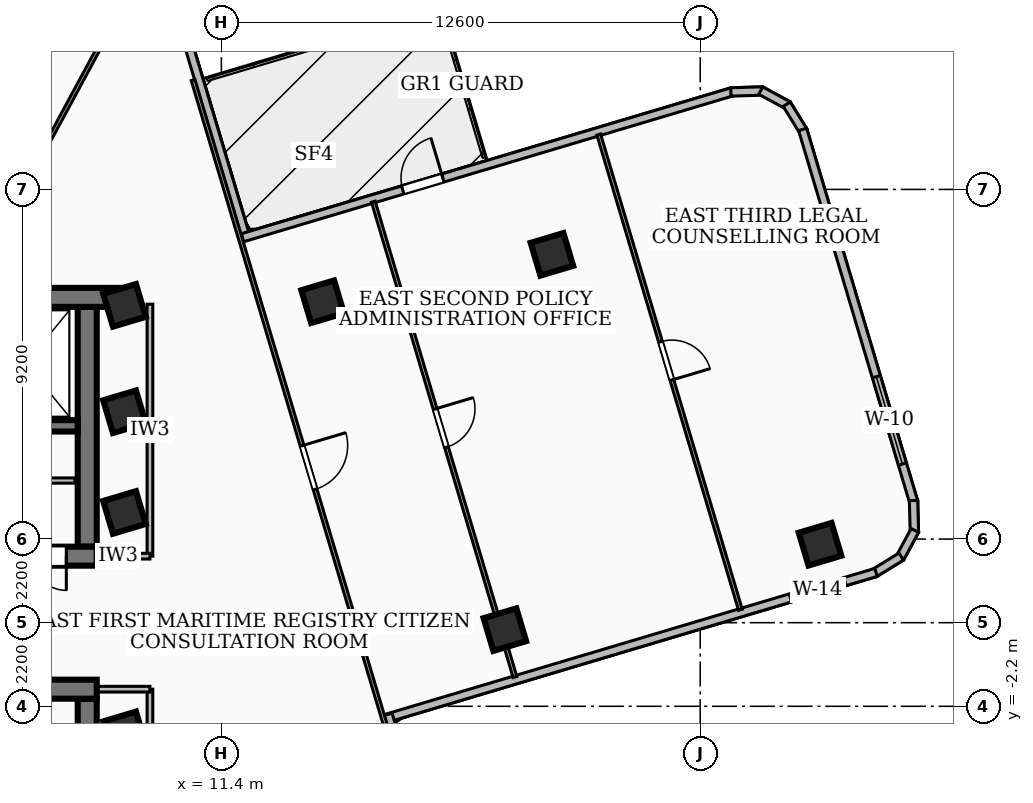
"""IFC4 building model, lengths in metres.
Left out: names, types, materials, properties, quantities, classifications, styles, units other than length and angle.
Written with IfcOpenShell. Run it as: python <this file> out.ifc"""

import sys

from ifc_helpers import new_model, si_unit, direction, frame, frame_2d, origin, origin_2d, place, context, subcontext, project, spatial, rectangle, extrude, element, fill, save


model = new_model("IFC4")
c1 = context("Model", 3, precision=1e-05, world=origin(), true_north=direction((0.0, 1.0)))
c2 = subcontext(c1, "Body", "Model", "MODEL_VIEW")
j1 = project(units=[si_unit("LENGTHUNIT", "METRE"), si_unit("PLANEANGLEUNIT", "RADIAN")], contexts=[c1])
p1 = place(None, origin())
s1 = spatial("IfcSite", under=j1, at=p1, CompositionType="ELEMENT")
p2 = place(p1, origin())
s2 = spatial("IfcBuilding", under=s1, at=p2, CompositionType="ELEMENT")
p3 = place(p2, frame((0.0, 0.0, 145.08)))
s3 = spatial("IfcBuildingStorey", under=s2, at=p3, CompositionType="ELEMENT", Elevation=145.08)
p4 = place(p3, frame((-8.78, 8.56, 0.0), z_axis=(0.0, 0.0, 1.0), x_axis=(1.0, 0.0, 0.0)))
e1 = element("IfcWall", 1, at=p4, inside=s3, PredefinedType="SHEAR", context=c2, shape_type="SweptSolid", body=[
    extrude(rectangle(XDim=17.56, YDim=0.5, at=frame_2d((8.78, 0.0))), origin(), (0.0, 0.0, 1.0), 3.32),
])
p5 = place(p3, frame((8.12, 1.75, 0.0), z_axis=(0.0, 0.0, 1.0), x_axis=(-1.0, 0.0, 0.0)))
e2 = element("IfcWall", 2, at=p5, inside=s3, PredefinedType="SHEAR", context=c2, shape_type="SweptSolid", body=[
    extrude(rectangle(XDim=16.24, YDim=0.5, at=frame_2d((8.12, 0.0))), origin(), (0.0, 0.0, 1.0), 3.32),
])
p6 = place(p5, frame((7.45, 0.0, 0.0)))
e3 = element("IfcOpeningElement", 3, at=p6, cuts=e2, PredefinedType="OPENING", context=c2, shape_type="SweptSolid", body=[
    extrude(rectangle(XDim=1.0, YDim=2.1, at=frame_2d((0.5, 1.05))), frame((0.0, 0.26, 0.0), z_axis=(0.0, -1.0, 0.0), x_axis=(1.0, 0.0, 0.0)), (0.0, 0.0, 1.0), 0.52),
])
p7 = place(p5, frame((3.85, 0.0, 0.0)))
e4 = element("IfcOpeningElement", 4, at=p7, cuts=e2, PredefinedType="OPENING", context=c2, shape_type="SweptSolid", body=[
    extrude(rectangle(XDim=0.9, YDim=2.06, at=frame_2d((0.45, 1.03))), frame((0.0, 0.26, 0.0), z_axis=(0.0, -1.0, 0.0), x_axis=(1.0, 0.0, 0.0)), (0.0, 0.0, 1.0), 0.52),
])
p8 = place(p5, frame((2.35, 0.0, 0.0)))
e5 = element("IfcOpeningElement", 5, at=p8, cuts=e2, PredefinedType="OPENING", context=c2, shape_type="SweptSolid", body=[
    extrude(rectangle(XDim=0.9, YDim=2.06, at=frame_2d((0.45, 1.03))), frame((0.0, 0.26, 0.0), z_axis=(0.0, -1.0, 0.0), x_axis=(1.0, 0.0, 0.0)), (0.0, 0.0, 1.0), 0.52),
])
p9 = place(p5, frame((0.8, 0.0, 0.0)))
e6 = element("IfcOpeningElement", 6, at=p9, cuts=e2, PredefinedType="OPENING", context=c2, shape_type="SweptSolid", body=[
    extrude(rectangle(XDim=0.9, YDim=2.06, at=frame_2d((0.45, 1.03))), frame((0.0, 0.26, 0.0), z_axis=(0.0, -1.0, 0.0), x_axis=(1.0, 0.0, 0.0)), (0.0, 0.0, 1.0), 0.52),
])
p10 = place(p3, frame((7.87, 8.31, 0.0), z_axis=(0.0, 0.0, 1.0), x_axis=(0.0, -1.0, 0.0)))
e7 = element("IfcWall", 7, at=p10, inside=s3, PredefinedType="SHEAR", context=c2, shape_type="SweptSolid", body=[
    extrude(rectangle(XDim=6.31, YDim=0.5, at=frame_2d((3.155, 0.0))), origin(), (0.0, 0.0, 1.0), 3.32),
])
p11 = place(p3, frame((7.62, 5.18, 0.0), z_axis=(0.0, 0.0, 1.0), x_axis=(-1.0, 0.0, 0.0)))
e8 = element("IfcWall", 8, at=p11, inside=s3, PredefinedType="SOLIDWALL", context=c2, shape_type="SweptSolid", body=[
    extrude(rectangle(XDim=15.24, YDim=0.3, at=frame_2d((7.62, 0.0))), origin(), (0.0, 0.0, 1.0), 3.32),
])
p12 = place(p11, frame((5.77, 0.0, 0.0)))
e9 = element("IfcOpeningElement", 9, at=p12, cuts=e8, PredefinedType="OPENING", context=c2, shape_type="SweptSolid", body=[
    extrude(rectangle(XDim=1.1, YDim=2.15, at=frame_2d((0.55, 1.075))), frame((0.0, 0.16, 0.0), z_axis=(0.0, -1.0, 0.0), x_axis=(1.0, 0.0, 0.0)), (0.0, 0.0, 1.0), 0.32),
])
p13 = place(p11, frame((2.97, 0.0, 0.0)))
e10 = element("IfcOpeningElement", 10, at=p13, cuts=e8, PredefinedType="OPENING", context=c2, shape_type="SweptSolid", body=[
    extrude(rectangle(XDim=1.1, YDim=2.15, at=frame_2d((0.55, 1.075))), frame((0.0, 0.16, 0.0), z_axis=(0.0, -1.0, 0.0), x_axis=(1.0, 0.0, 0.0)), (0.0, 0.0, 1.0), 0.32),
])
p14 = place(p11, frame((7.97, 0.0, 0.0)))
e11 = element("IfcOpeningElement", 11, at=p14, cuts=e8, PredefinedType="OPENING", context=c2, shape_type="SweptSolid", body=[
    extrude(rectangle(XDim=1.0, YDim=2.1, at=frame_2d((0.5, 1.05))), frame((0.0, 0.16, 0.0), z_axis=(0.0, -1.0, 0.0), x_axis=(1.0, 0.0, 0.0)), (0.0, 0.0, 1.0), 0.32),
])
p15 = place(p3, frame((-8.12, -1.75, 0.0), z_axis=(0.0, 0.0, 1.0), x_axis=(1.0, 0.0, 0.0)))
e12 = element("IfcWall", 12, at=p15, inside=s3, PredefinedType="SHEAR", context=c2, shape_type="SweptSolid", body=[
    extrude(rectangle(XDim=16.24, YDim=0.5, at=frame_2d((8.12, 0.0))), origin(), (0.0, 0.0, 1.0), 3.32),
])
p16 = place(p15, frame((7.45, 0.0, 0.0)))
e13 = element("IfcOpeningElement", 13, at=p16, cuts=e12, PredefinedType="OPENING", context=c2, shape_type="SweptSolid", body=[
    extrude(rectangle(XDim=1.0, YDim=2.1, at=frame_2d((0.5, 1.05))), frame((0.0, 0.26, 0.0), z_axis=(0.0, -1.0, 0.0), x_axis=(1.0, 0.0, 0.0)), (0.0, 0.0, 1.0), 0.52),
])
p17 = place(p15, frame((12.65, 0.0, 0.0)))
e14 = element("IfcOpeningElement", 14, at=p17, cuts=e12, PredefinedType="OPENING", context=c2, shape_type="SweptSolid", body=[
    extrude(rectangle(XDim=0.9, YDim=2.06, at=frame_2d((0.45, 1.03))), frame((0.0, 0.26, 0.0), z_axis=(0.0, -1.0, 0.0), x_axis=(1.0, 0.0, 0.0)), (0.0, 0.0, 1.0), 0.52),
])
p18 = place(p15, frame((0.565, 0.0, 0.0)))
e15 = element("IfcOpeningElement", 15, at=p18, cuts=e12, PredefinedType="OPENING", context=c2, shape_type="SweptSolid", body=[
    extrude(rectangle(XDim=1.05, YDim=2.15, at=frame_2d((0.525, 1.075))), frame((0.0, 0.26, 0.0), z_axis=(0.0, -1.0, 0.0), x_axis=(1.0, 0.0, 0.0)), (0.0, 0.0, 1.0), 0.52),
])
p19 = place(p15, frame((2.125, 0.0, 0.0)))
e16 = element("IfcOpeningElement", 16, at=p19, cuts=e12, PredefinedType="OPENING", context=c2, shape_type="SweptSolid", body=[
    extrude(rectangle(XDim=1.05, YDim=2.15, at=frame_2d((0.525, 1.075))), frame((0.0, 0.26, 0.0), z_axis=(0.0, -1.0, 0.0), x_axis=(1.0, 0.0, 0.0)), (0.0, 0.0, 1.0), 0.52),
])
p20 = place(p15, frame((3.685, 0.0, 0.0)))
e17 = element("IfcOpeningElement", 17, at=p20, cuts=e12, PredefinedType="OPENING", context=c2, shape_type="SweptSolid", body=[
    extrude(rectangle(XDim=1.05, YDim=2.15, at=frame_2d((0.525, 1.075))), frame((0.0, 0.26, 0.0), z_axis=(0.0, -1.0, 0.0), x_axis=(1.0, 0.0, 0.0)), (0.0, 0.0, 1.0), 0.52),
])
p21 = place(p3, frame((7.87, -2.0, 0.0), z_axis=(0.0, 0.0, 1.0), x_axis=(0.0, -1.0, 0.0)))
e18 = element("IfcWall", 18, at=p21, inside=s3, PredefinedType="SHEAR", context=c2, shape_type="SweptSolid", body=[
    extrude(rectangle(XDim=6.31, YDim=0.5, at=frame_2d((3.155, 0.0))), origin(), (0.0, 0.0, 1.0), 3.32),
])
for number, where, z_axis, x_axis in (
    (19, (8.85, -2.9, 0.0), (0.0, 0.0, 1.0), (0.958, 0.286, 0.0)),
    (20, (8.85, 2.9, 0.0), (0.0, 0.0, 1.0), (0.958, 0.286, 0.0)),
    (21, (8.85, 5.55, 0.0), (0.0, 0.0, 1.0), (0.958, 0.286, 0.0)),
    (22, (8.85, 8.35, 0.0), (0.0, 0.0, 1.0), (0.958, 0.286, 0.0)),
    (23, (18.86, -0.183, 0.0), (0.0, 0.0, 1.0), (0.958, 0.286, 0.0)),
    (24, (14.064, 8.445, 0.0), (0.0, 0.0, 1.0), (0.958, 0.286, 0.0)),
    (25, (27.153, 2.064, 0.0), (0.0, 0.0, 1.0), (0.958, 0.286, 0.0)),
    (26, (20.098, 9.692, 0.0), (0.0, 0.0, 1.0), (0.958, 0.286, 0.0)),
):
    element("IfcColumn", number, at=place(p3, frame(where, z_axis=z_axis, x_axis=x_axis)), inside=s3, PredefinedType="COLUMN", context=c2, shape_type="SweptSolid", body=[
        extrude(rectangle(XDim=0.9, YDim=0.9, at=origin_2d()), origin(), (0.0, 0.0, 1.0), 3.6),
    ])
p22 = place(p3, frame((10.136, 16.546, 0.0), z_axis=(0.0, 0.0, 1.0), x_axis=(0.285607207592, -0.958346765514, 0.0)))
e27 = element("IfcWall", 27, at=p22, inside=s3, PredefinedType="SOLIDWALL", context=c2, shape_type="SweptSolid", body=[
    extrude(rectangle(XDim=6.757, YDim=0.22, at=frame_2d((3.379, 0.0))), origin(), (0.0, 0.0, 1.0), 3.32),
])
p23 = place(p3, frame((11.957, 10.129, 0.0), z_axis=(0.0, 0.0, 1.0), x_axis=(0.958343962332, 0.285616613419, 0.0)))
e28 = element("IfcWall", 28, at=p23, inside=s3, PredefinedType="SOLIDWALL", context=c2, shape_type="SweptSolid", body=[
    extrude(rectangle(XDim=13.458, YDim=0.22, at=frame_2d((6.729, 0.0))), origin(), (0.0, 0.0, 1.0), 3.32),
])
p24 = place(p23, frame((4.4, 0.0, 0.0)))
e29 = element("IfcOpeningElement", 29, at=p24, cuts=e28, PredefinedType="OPENING", context=c2, shape_type="SweptSolid", body=[
    extrude(rectangle(XDim=1.1, YDim=2.1, at=frame_2d((0.55, 1.05))), frame((0.0, 0.12, 0.0), z_axis=(0.0, -1.0, 0.0), x_axis=(1.0, 0.0, 0.0)), (0.0, 0.0, 1.0), 0.24),
])
p25 = place(p3, frame((24.806, 13.965, 0.0), z_axis=(0.0, 0.0, 1.0), x_axis=(0.999587773882, 0.028710317069, 0.0)))
e30 = element("IfcWall", 30, at=p25, inside=s3, PredefinedType="SOLIDWALL", context=c2, shape_type="SweptSolid", body=[
    extrude(rectangle(XDim=0.833, YDim=0.22, at=frame_2d((0.417, 0.0))), origin(), (0.0, 0.0, 1.0), 3.32),
])
p26 = place(p3, frame((25.592, 14.0, 0.0), z_axis=(0.0, 0.0, 1.0), x_axis=(0.879608832869, -0.47569769932, 0.0)))
e31 = element("IfcWall", 31, at=p26, inside=s3, PredefinedType="SOLIDWALL", context=c2, shape_type="SweptSolid", body=[
    extrude(rectangle(XDim=0.82, YDim=0.22, at=frame_2d((0.41, 0.0))), origin(), (0.0, 0.0, 1.0), 3.32),
])
p27 = place(p3, frame((26.278, 13.643, 0.0), z_axis=(0.0, 0.0, 1.0), x_axis=(0.524195456684, -0.851597982144, 0.0)))
e32 = element("IfcWall", 32, at=p27, inside=s3, PredefinedType="SOLIDWALL", context=c2, shape_type="SweptSolid", body=[
    extrude(rectangle(XDim=0.834, YDim=0.22, at=frame_2d((0.417, 0.0))), origin(), (0.0, 0.0, 1.0), 3.32),
])
p28 = place(p3, frame((26.695, 12.978, 0.0), z_axis=(0.0, 0.0, 1.0), x_axis=(0.285720239165, -0.958313072504, 0.0)))
e33 = element("IfcWall", 33, at=p28, inside=s3, PredefinedType="SOLIDWALL", context=c2, shape_type="SweptSolid", body=[
    extrude(rectangle(XDim=10.241, YDim=0.22, at=frame_2d((5.121, 0.0))), origin(), (0.0, 0.0, 1.0), 3.32),
])
p29 = place(p28, frame((6.788, 0.0, 0.85)))
e34 = element("IfcOpeningElement", 34, at=p29, cuts=e33, PredefinedType="OPENING", context=c2, shape_type="SweptSolid", body=[
    extrude(rectangle(XDim=2.4, YDim=1.65, at=frame_2d((1.2, 0.825))), frame((0.0, 0.12, 0.0), z_axis=(0.0, -1.0, 0.0), x_axis=(1.0, 0.0, 0.0)), (0.0, 0.0, 1.0), 0.24),
])
p30 = place(p3, frame((29.613, 3.213, 0.0), z_axis=(0.0, 0.0, 1.0), x_axis=(0.027507151941, -0.999621606705, 0.0)))
e35 = element("IfcWall", 35, at=p30, inside=s3, PredefinedType="SOLIDWALL", context=c2, shape_type="SweptSolid", body=[
    extrude(rectangle(XDim=0.834, YDim=0.22, at=frame_2d((0.417, 0.0))), origin(), (0.0, 0.0, 1.0), 3.32),
])
p31 = place(p3, frame((29.647, 2.426, 0.0), z_axis=(0.0, 0.0, 1.0), x_axis=(-0.474775054815, -0.880107179453, 0.0)))
e36 = element("IfcWall", 36, at=p31, inside=s3, PredefinedType="SOLIDWALL", context=c2, shape_type="SweptSolid", body=[
    extrude(rectangle(XDim=0.819, YDim=0.22, at=frame_2d((0.41, 0.0))), origin(), (0.0, 0.0, 1.0), 3.32),
])
p32 = place(p3, frame((29.291, 1.74, 0.0), z_axis=(0.0, 0.0, 1.0), x_axis=(-0.851597982144, -0.524195456684, 0.0)))
e37 = element("IfcWall", 37, at=p32, inside=s3, PredefinedType="SOLIDWALL", context=c2, shape_type="SweptSolid", body=[
    extrude(rectangle(XDim=0.834, YDim=0.22, at=frame_2d((0.417, 0.0))), origin(), (0.0, 0.0, 1.0), 3.32),
])
p33 = place(p3, frame((28.626, 1.323, 0.0), z_axis=(0.0, 0.0, 1.0), x_axis=(-0.958343962332, -0.285616613419, 0.0)))
e38 = element("IfcWall", 38, at=p33, inside=s3, PredefinedType="SOLIDWALL", context=c2, shape_type="SweptSolid", body=[
    extrude(rectangle(XDim=13.458, YDim=0.22, at=frame_2d((6.729, 0.0))), origin(), (0.0, 0.0, 1.0), 3.32),
])
p34 = place(p33, frame((0.85, 0.0, 0.85)))
e39 = element("IfcOpeningElement", 39, at=p34, cuts=e38, PredefinedType="OPENING", context=c2, shape_type="SweptSolid", body=[
    extrude(rectangle(XDim=1.5, YDim=1.5, at=frame_2d((0.75, 0.75))), frame((0.0, 0.12, 0.0), z_axis=(0.0, -1.0, 0.0), x_axis=(1.0, 0.0, 0.0)), (0.0, 0.0, 1.0), 0.24),
])
p35 = place(p3, frame((15.787, -2.412, 0.0), z_axis=(0.0, 0.0, 1.0), x_axis=(0.285712854037, -0.958315274342, 0.0)))
e40 = element("IfcWall", 40, at=p35, inside=s3, PredefinedType="SOLIDWALL", context=c2, shape_type="SweptSolid", body=[
    extrude(rectangle(XDim=6.139, YDim=0.22, at=frame_2d((3.069, 0.0))), origin(), (0.0, 0.0, 1.0), 3.32),
])
p36 = place(p3, frame((2.9, 3.74, 0.0), z_axis=(0.0, 0.0, 1.0), x_axis=(1.0, 0.0, 0.0)))
e41 = element("IfcWall", 41, at=p36, inside=s3, PredefinedType="PARTITIONING", context=c2, shape_type="SweptSolid", body=[
    extrude(rectangle(XDim=4.65, YDim=0.138, at=frame_2d((2.325, 0.0))), origin(), (0.0, 0.0, 1.0), 3.32),
])
p37 = place(p3, frame((9.52, 1.75, 0.0), z_axis=(0.0, 0.0, 1.0), x_axis=(0.0, 1.0, 0.0)))
e42 = element("IfcWall", 42, at=p37, inside=s3, PredefinedType="PARTITIONING", context=c2, shape_type="SweptSolid", body=[
    extrude(rectangle(XDim=6.63, YDim=0.15, at=frame_2d((3.315, 0.0))), origin(), (0.0, 0.0, 1.0), 2.55),
])
p38 = place(p3, frame((7.85, 1.75, 0.0), z_axis=(0.0, 0.0, 1.0), x_axis=(1.0, 0.0, 0.0)))
e43 = element("IfcWall", 43, at=p38, inside=s3, PredefinedType="PARTITIONING", context=c2, shape_type="SweptSolid", body=[
    extrude(rectangle(XDim=1.67, YDim=0.15, at=frame_2d((0.835, 0.0))), origin(), (0.0, 0.0, 1.0), 2.55),
])
p39 = place(p3, frame((9.52, -8.38, 0.0), z_axis=(0.0, 0.0, 1.0), x_axis=(0.0, 1.0, 0.0)))
e44 = element("IfcWall", 44, at=p39, inside=s3, PredefinedType="PARTITIONING", context=c2, shape_type="SweptSolid", body=[
    extrude(rectangle(XDim=6.63, YDim=0.15, at=frame_2d((3.315, 0.0))), origin(), (0.0, 0.0, 1.0), 2.55),
])
p40 = place(p3, frame((7.85, -1.75, 0.0), z_axis=(0.0, 0.0, 1.0), x_axis=(1.0, 0.0, 0.0)))
e45 = element("IfcWall", 45, at=p40, inside=s3, PredefinedType="PARTITIONING", context=c2, shape_type="SweptSolid", body=[
    extrude(rectangle(XDim=1.67, YDim=0.15, at=frame_2d((0.835, 0.0))), origin(), (0.0, 0.0, 1.0), 2.55),
])
p41 = place(p3, frame((5.612, 10.38, 0.0), z_axis=(0.0, 0.0, 1.0), x_axis=(0.475666815962, 0.879625534073, 0.0)))
e46 = element("IfcWall", 46, at=p41, inside=s3, PredefinedType="PARTITIONING", context=c2, shape_type="SweptSolid", body=[
    extrude(rectangle(XDim=7.875, YDim=0.1, at=frame_2d((3.938, 0.0))), origin(), (0.0, 0.0, 1.0), 2.55),
])
p42 = place(p3, frame((10.655, 14.279, 0.0), z_axis=(0.0, 0.0, 1.0), x_axis=(0.285665949025, -0.958329257389, 0.0)))
e47 = element("IfcWall", 47, at=p42, inside=s3, PredefinedType="PARTITIONING", context=c2, shape_type="SweptSolid", body=[
    extrude(rectangle(XDim=20.66, YDim=0.1, at=frame_2d((10.33, 0.0))), origin(), (0.0, 0.0, 1.0), 2.55),
])
p43 = place(p42, frame((10.04, 0.0, 0.0)))
e48 = element("IfcOpeningElement", 48, at=p43, cuts=e47, PredefinedType="OPENING", context=c2, shape_type="SweptSolid", body=[
    extrude(rectangle(XDim=1.2, YDim=2.1, at=frame_2d((0.6, 1.05))), frame((0.0, 0.06, 0.0), z_axis=(0.0, -1.0, 0.0), x_axis=(1.0, 0.0, 0.0)), (0.0, 0.0, 1.0), 0.12),
])
p44 = place(p3, frame((15.398, 11.076, 0.0), z_axis=(0.0, 0.0, 1.0), x_axis=(0.285679130118, -0.958325328171, 0.0)))
e49 = element("IfcWall", 49, at=p44, inside=s3, PredefinedType="PARTITIONING", context=c2, shape_type="SweptSolid", body=[
    extrude(rectangle(XDim=13.05, YDim=0.1, at=frame_2d((6.525, 0.0))), origin(), (0.0, 0.0, 1.0), 2.55),
])
p45 = place(p44, frame((5.69, 0.0, 0.0)))
e50 = element("IfcOpeningElement", 50, at=p45, cuts=e49, PredefinedType="OPENING", context=c2, shape_type="SweptSolid", body=[
    extrude(rectangle(XDim=1.05, YDim=2.08, at=frame_2d((0.525, 1.04))), frame((0.0, 0.06, 0.0), z_axis=(0.0, -1.0, 0.0), x_axis=(1.0, 0.0, 0.0)), (0.0, 0.0, 1.0), 0.12),
])
p46 = place(p3, frame((21.33, 12.844, 0.0), z_axis=(0.0, 0.0, 1.0), x_axis=(0.285674008308, -0.958326854981, 0.0)))
e51 = element("IfcWall", 51, at=p46, inside=s3, PredefinedType="PARTITIONING", context=c2, shape_type="SweptSolid", body=[
    extrude(rectangle(XDim=13.05, YDim=0.1, at=frame_2d((6.525, 0.0))), origin(), (0.0, 0.0, 1.0), 2.55),
])
p47 = place(p46, frame((5.69, 0.0, 0.0)))
e52 = element("IfcOpeningElement", 52, at=p47, cuts=e51, PredefinedType="OPENING", context=c2, shape_type="SweptSolid", body=[
    extrude(rectangle(XDim=1.05, YDim=2.08, at=frame_2d((0.525, 1.04))), frame((0.0, 0.06, 0.0), z_axis=(0.0, -1.0, 0.0), x_axis=(1.0, 0.0, 0.0)), (0.0, 0.0, 1.0), 0.12),
])
p48 = place(p24, origin())
e53 = element("IfcDoor", 53, at=p48, inside=s3, OperationType="SINGLE_SWING_RIGHT", PredefinedType="DOOR", context=c2, shape_type="SweptSolid", body=[
    extrude(rectangle(XDim=1.1, YDim=2.1, at=frame_2d((0.55, 1.05))), frame((0.0, 0.025, 0.0), z_axis=(0.0, -1.0, 0.0), x_axis=(1.0, 0.0, 0.0)), (0.0, 0.0, 1.0), 0.05),
])
fill(e29, e53)
p49 = place(p29, origin())
e54 = element("IfcWindow", 54, at=p49, inside=s3, PartitioningType="SINGLE_PANEL", PredefinedType="WINDOW", context=c2, shape_type="SweptSolid", body=[
    extrude(rectangle(XDim=2.4, YDim=1.65, at=frame_2d((1.2, 0.825))), frame((0.0, 0.03, 0.0), z_axis=(0.0, -1.0, 0.0), x_axis=(1.0, 0.0, 0.0)), (0.0, 0.0, 1.0), 0.06),
])
fill(e34, e54)
p50 = place(p34, origin())
e55 = element("IfcWindow", 55, at=p50, inside=s3, PartitioningType="SINGLE_PANEL", PredefinedType="WINDOW", context=c2, shape_type="SweptSolid", body=[
    extrude(rectangle(XDim=1.5, YDim=1.5, at=frame_2d((0.75, 0.75))), frame((0.0, 0.03, 0.0), z_axis=(0.0, -1.0, 0.0), x_axis=(1.0, 0.0, 0.0)), (0.0, 0.0, 1.0), 0.06),
])
fill(e39, e55)
p51 = place(p9, origin())
e56 = element("IfcDoor", 56, at=p51, inside=s3, OperationType="SINGLE_SWING_LEFT", PredefinedType="DOOR", context=c2, shape_type="SweptSolid", body=[
    extrude(rectangle(XDim=0.9, YDim=2.06, at=frame_2d((0.45, 1.03))), frame((0.0, 0.025, 0.0), z_axis=(0.0, -1.0, 0.0), x_axis=(1.0, 0.0, 0.0)), (0.0, 0.0, 1.0), 0.05),
])
fill(e6, e56)
p52 = place(p43, origin())
e57 = element("IfcDoor", 57, at=p52, inside=s3, OperationType="SINGLE_SWING_LEFT", PredefinedType="DOOR", context=c2, shape_type="SweptSolid", body=[
    extrude(rectangle(XDim=1.2, YDim=2.1, at=frame_2d((0.6, 1.05))), frame((0.0, 0.025, 0.0), z_axis=(0.0, -1.0, 0.0), x_axis=(1.0, 0.0, 0.0)), (0.0, 0.0, 1.0), 0.05),
])
fill(e48, e57)
p53 = place(p45, origin())
e58 = element("IfcDoor", 58, at=p53, inside=s3, OperationType="SINGLE_SWING_LEFT", PredefinedType="DOOR", context=c2, shape_type="SweptSolid", body=[
    extrude(rectangle(XDim=1.05, YDim=2.08, at=frame_2d((0.525, 1.04))), frame((0.0, 0.025, 0.0), z_axis=(0.0, -1.0, 0.0), x_axis=(1.0, 0.0, 0.0)), (0.0, 0.0, 1.0), 0.05),
])
fill(e50, e58)
p54 = place(p47, origin())
e59 = element("IfcDoor", 59, at=p54, inside=s3, OperationType="SINGLE_SWING_RIGHT", PredefinedType="DOOR", context=c2, shape_type="SweptSolid", body=[
    extrude(rectangle(XDim=1.05, YDim=2.08, at=frame_2d((0.525, 1.04))), frame((0.0, 0.025, 0.0), z_axis=(0.0, -1.0, 0.0), x_axis=(1.0, 0.0, 0.0)), (0.0, 0.0, 1.0), 0.05),
])
fill(e52, e59)
save(model, sys.argv[1])
